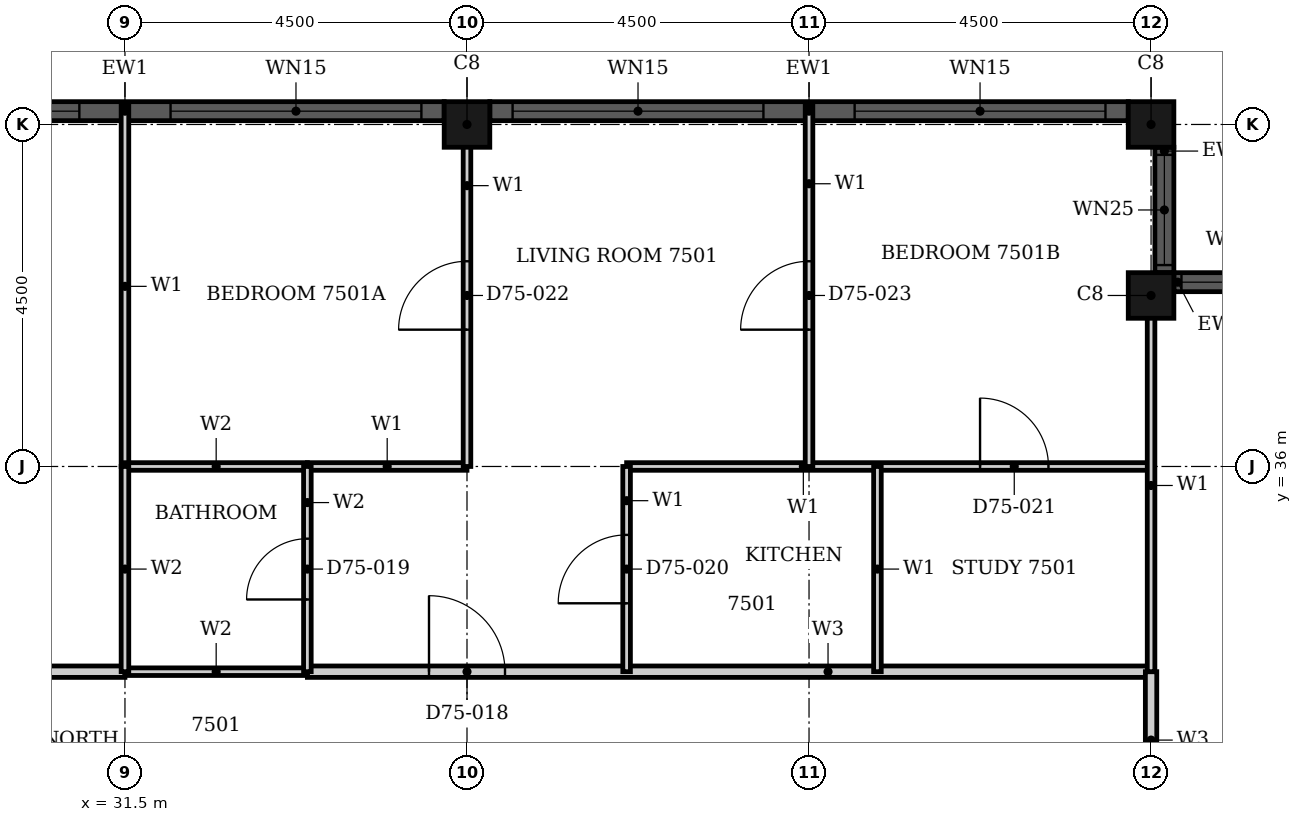
"""IFC4 building model, lengths in metres.
Left out: names, types, materials, properties, quantities, classifications, styles, units other than length and angle.
Written with IfcOpenShell. Run it as: python <this file> out.ifc"""

import sys

from ifc_helpers import new_model, si_unit, direction, frame, frame_2d, origin, origin_2d, place, context, subcontext, project, spatial, rectangle, hollow_rectangle, extrude, element, fill, save


model = new_model("IFC4")
c1 = context("Model", 3, precision=1e-05, world=origin(), true_north=direction((0.0, 1.0)))
c2 = subcontext(c1, "Body", "Model", "MODEL_VIEW")
j1 = project(units=[si_unit("LENGTHUNIT", "METRE"), si_unit("PLANEANGLEUNIT", "RADIAN")], contexts=[c1])
p1 = place(None, origin())
s1 = spatial("IfcSite", under=j1, at=p1, CompositionType="ELEMENT")
p2 = place(p1, origin())
s2 = spatial("IfcBuilding", under=s1, at=p2, CompositionType="ELEMENT")
p3 = place(p2, frame((0.0, 0.0, 294.5)))
s3 = spatial("IfcBuildingStorey", under=s2, at=p3, CompositionType="ELEMENT", Elevation=294.5)
for number, where, z_axis, x_axis in (
    (1, (45.0, 38.25, 0.0), (0.0, 0.0, 1.0), (1.0, 0.0, 0.0)),
    (2, (45.0, 40.5, 0.0), (0.0, 0.0, 1.0), (1.0, 0.0, 0.0)),
    (3, (36.0, 40.5, 0.0), (0.0, 0.0, 1.0), (1.0, 0.0, 0.0)),
):
    element("IfcColumn", number, at=place(p3, frame(where, z_axis=z_axis, x_axis=x_axis)), inside=s3, PredefinedType="COLUMN", context=c2, shape_type="SweptSolid", body=[
        extrude(hollow_rectangle(XDim=0.6, YDim=0.6, WallThickness=0.02, at=origin_2d()), origin(), (0.0, 0.0, 1.0), 3.7),
    ])
p4 = place(p3, frame((46.95, 38.425, 0.0), z_axis=(0.0, 0.0, 1.0), x_axis=(-1.0, 0.0, 0.0)))
e4 = element("IfcWall", 4, at=p4, inside=s3, PredefinedType="SOLIDWALL", context=c2, shape_type="SweptSolid", body=[
    extrude(rectangle(XDim=1.65, YDim=0.25, at=frame_2d((0.825, 0.0))), origin(), (0.0, 0.0, 1.0), 3.7),
])
p5 = place(p4, frame((0.1, 0.0, 0.9)))
e5 = element("IfcOpeningElement", 5, at=p5, cuts=e4, PredefinedType="OPENING", context=c2, shape_type="SweptSolid", body=[
    extrude(rectangle(XDim=1.45, YDim=1.85, at=frame_2d((0.725, 0.925))), frame((0.0, 0.135, 0.0), z_axis=(0.0, -1.0, 0.0), x_axis=(1.0, 0.0, 0.0)), (0.0, 0.0, 1.0), 0.27),
])
p6 = place(p3, frame((45.175, 38.55, 0.0), z_axis=(0.0, 0.0, 1.0), x_axis=(0.0, 1.0, 0.0)))
e6 = element("IfcWall", 6, at=p6, inside=s3, PredefinedType="SOLIDWALL", context=c2, shape_type="SweptSolid", body=[
    extrude(rectangle(XDim=1.65, YDim=0.25, at=frame_2d((0.825, 0.0))), origin(), (0.0, 0.0, 1.0), 3.7),
])
p7 = place(p6, frame((0.1, 0.0, 0.9)))
e7 = element("IfcOpeningElement", 7, at=p7, cuts=e6, PredefinedType="OPENING", context=c2, shape_type="SweptSolid", body=[
    extrude(rectangle(XDim=1.45, YDim=1.85, at=frame_2d((0.725, 0.925))), frame((0.0, 0.135, 0.0), z_axis=(0.0, -1.0, 0.0), x_axis=(1.0, 0.0, 0.0)), (0.0, 0.0, 1.0), 0.27),
])
p8 = place(p3, frame((44.7, 40.675, 0.0), z_axis=(0.0, 0.0, 1.0), x_axis=(-1.0, 0.0, 0.0)))
e8 = element("IfcWall", 8, at=p8, inside=s3, PredefinedType="SOLIDWALL", context=c2, shape_type="SweptSolid", body=[
    extrude(rectangle(XDim=8.4, YDim=0.25, at=frame_2d((4.2, 0.0))), origin(), (0.0, 0.0, 1.0), 3.7),
])
p9 = place(p8, frame((0.3, 0.0, 0.45)))
e9 = element("IfcOpeningElement", 9, at=p9, cuts=e8, PredefinedType="OPENING", context=c2, shape_type="SweptSolid", body=[
    extrude(rectangle(XDim=3.3, YDim=2.3, at=frame_2d((1.65, 1.15))), frame((0.0, 0.135, 0.0), z_axis=(0.0, -1.0, 0.0), x_axis=(1.0, 0.0, 0.0)), (0.0, 0.0, 1.0), 0.27),
])
p10 = place(p8, frame((4.8, 0.0, 0.45)))
e10 = element("IfcOpeningElement", 10, at=p10, cuts=e8, PredefinedType="OPENING", context=c2, shape_type="SweptSolid", body=[
    extrude(rectangle(XDim=3.3, YDim=2.3, at=frame_2d((1.65, 1.15))), frame((0.0, 0.135, 0.0), z_axis=(0.0, -1.0, 0.0), x_axis=(1.0, 0.0, 0.0)), (0.0, 0.0, 1.0), 0.27),
])
p11 = place(p3, frame((35.7, 40.675, 0.0), z_axis=(0.0, 0.0, 1.0), x_axis=(-1.0, 0.0, 0.0)))
e11 = element("IfcWall", 11, at=p11, inside=s3, PredefinedType="SOLIDWALL", context=c2, shape_type="SweptSolid", body=[
    extrude(rectangle(XDim=8.4, YDim=0.25, at=frame_2d((4.2, 0.0))), origin(), (0.0, 0.0, 1.0), 3.7),
])
p12 = place(p11, frame((0.3, 0.0, 0.45)))
e12 = element("IfcOpeningElement", 12, at=p12, cuts=e11, PredefinedType="OPENING", context=c2, shape_type="SweptSolid", body=[
    extrude(rectangle(XDim=3.3, YDim=2.3, at=frame_2d((1.65, 1.15))), frame((0.0, 0.135, 0.0), z_axis=(0.0, -1.0, 0.0), x_axis=(1.0, 0.0, 0.0)), (0.0, 0.0, 1.0), 0.27),
])
p13 = place(p11, frame((4.8, 0.0, 0.45)))
e13 = element("IfcOpeningElement", 13, at=p13, cuts=e11, PredefinedType="OPENING", context=c2, shape_type="SweptSolid", body=[
    extrude(rectangle(XDim=3.3, YDim=2.3, at=frame_2d((1.65, 1.15))), frame((0.0, 0.135, 0.0), z_axis=(0.0, -1.0, 0.0), x_axis=(1.0, 0.0, 0.0)), (0.0, 0.0, 1.0), 0.27),
])
p14 = place(p3, frame((18.0, 33.3, 0.0), z_axis=(0.0, 0.0, 1.0), x_axis=(1.0, 0.0, 0.0)))
e14 = element("IfcWall", 14, at=p14, inside=s3, PredefinedType="PARTITIONING", context=c2, shape_type="SweptSolid", body=[
    extrude(rectangle(XDim=13.5, YDim=0.15, at=frame_2d((6.75, 0.0))), origin(), (0.0, 0.0, 1.0), 3.4),
])
p15 = place(p14, frame((6.25, 0.0, 0.0)))
e15 = element("IfcOpeningElement", 15, at=p15, cuts=e14, PredefinedType="OPENING", context=c2, shape_type="SweptSolid", body=[
    extrude(rectangle(XDim=1.0, YDim=2.1, at=frame_2d((0.5, 1.05))), frame((0.0, 0.085, 0.0), z_axis=(0.0, -1.0, 0.0), x_axis=(1.0, 0.0, 0.0)), (0.0, 0.0, 1.0), 0.17),
])
p16 = place(p3, frame((33.9, 33.3, 0.0), z_axis=(0.0, 0.0, 1.0), x_axis=(1.0, 0.0, 0.0)))
e16 = element("IfcWall", 16, at=p16, inside=s3, PredefinedType="PARTITIONING", context=c2, shape_type="SweptSolid", body=[
    extrude(rectangle(XDim=11.1, YDim=0.15, at=frame_2d((5.55, 0.0))), origin(), (0.0, 0.0, 1.0), 3.4),
])
p17 = place(p16, frame((1.6, 0.0, 0.0)))
e17 = element("IfcOpeningElement", 17, at=p17, cuts=e16, PredefinedType="OPENING", context=c2, shape_type="SweptSolid", body=[
    extrude(rectangle(XDim=1.0, YDim=2.2, at=frame_2d((0.5, 1.1))), frame((0.0, 0.085, 0.0), z_axis=(0.0, -1.0, 0.0), x_axis=(1.0, 0.0, 0.0)), (0.0, 0.0, 1.0), 0.17),
])
p18 = place(p3, frame((45.0, 31.5, 0.0), z_axis=(0.0, 0.0, 1.0), x_axis=(0.0, 1.0, 0.0)))
e18 = element("IfcWall", 18, at=p18, inside=s3, PredefinedType="PARTITIONING", context=c2, shape_type="SweptSolid", body=[
    extrude(rectangle(XDim=1.8, YDim=0.15, at=frame_2d((0.9, 0.0))), origin(), (0.0, 0.0, 1.0), 3.4),
])
p19 = place(p3, frame((33.9, 36.0, 0.0), z_axis=(0.0, 0.0, 1.0), x_axis=(1.0, 0.0, 0.0)))
e19 = element("IfcWall", 19, at=p19, inside=s3, PredefinedType="PARTITIONING", context=c2, shape_type="SweptSolid", body=[
    extrude(rectangle(XDim=2.1, YDim=0.1, at=frame_2d((1.05, 0.0))), origin(), (0.0, 0.0, 1.0), 3.4),
])
p20 = place(p3, frame((38.1, 36.0, 0.0), z_axis=(0.0, 0.0, 1.0), x_axis=(1.0, 0.0, 0.0)))
e20 = element("IfcWall", 20, at=p20, inside=s3, PredefinedType="PARTITIONING", context=c2, shape_type="SweptSolid", body=[
    extrude(rectangle(XDim=6.9, YDim=0.1, at=frame_2d((3.45, 0.0))), origin(), (0.0, 0.0, 1.0), 3.4),
])
p21 = place(p20, frame((4.65, 0.0, 0.0)))
e21 = element("IfcOpeningElement", 21, at=p21, cuts=e20, PredefinedType="OPENING", context=c2, shape_type="SweptSolid", body=[
    extrude(rectangle(XDim=0.9, YDim=2.1, at=frame_2d((0.45, 1.05))), frame((0.0, 0.06, 0.0), z_axis=(0.0, -1.0, 0.0), x_axis=(1.0, 0.0, 0.0)), (0.0, 0.0, 1.0), 0.12),
])
p22 = place(p3, frame((31.5, 36.0, 0.0), z_axis=(0.0, 0.0, 1.0), x_axis=(0.0, 1.0, 0.0)))
e22 = element("IfcWall", 22, at=p22, inside=s3, PredefinedType="PARTITIONING", context=c2, shape_type="SweptSolid", body=[
    extrude(rectangle(XDim=4.74, YDim=0.1, at=frame_2d((2.37, 0.0))), origin(), (0.0, 0.0, 1.0), 3.4),
])
p23 = place(p3, frame((36.0, 36.0, 0.0), z_axis=(0.0, 0.0, 1.0), x_axis=(0.0, 1.0, 0.0)))
e23 = element("IfcWall", 23, at=p23, inside=s3, PredefinedType="PARTITIONING", context=c2, shape_type="SweptSolid", body=[
    extrude(rectangle(XDim=4.69, YDim=0.1, at=frame_2d((2.345, 0.0))), origin(), (0.0, 0.0, 1.0), 3.4),
])
p24 = place(p23, frame((1.8, 0.0, 0.0)))
e24 = element("IfcOpeningElement", 24, at=p24, cuts=e23, PredefinedType="OPENING", context=c2, shape_type="SweptSolid", body=[
    extrude(rectangle(XDim=0.9, YDim=2.1, at=frame_2d((0.45, 1.05))), frame((0.0, 0.06, 0.0), z_axis=(0.0, -1.0, 0.0), x_axis=(1.0, 0.0, 0.0)), (0.0, 0.0, 1.0), 0.12),
])
p25 = place(p3, frame((38.1, 33.3, 0.0), z_axis=(0.0, 0.0, 1.0), x_axis=(0.0, 1.0, 0.0)))
e25 = element("IfcWall", 25, at=p25, inside=s3, PredefinedType="PARTITIONING", context=c2, shape_type="SweptSolid", body=[
    extrude(rectangle(XDim=2.7, YDim=0.1, at=frame_2d((1.35, 0.0))), origin(), (0.0, 0.0, 1.0), 3.4),
])
p26 = place(p25, frame((0.9, 0.0, 0.0)))
e26 = element("IfcOpeningElement", 26, at=p26, cuts=e25, PredefinedType="OPENING", context=c2, shape_type="SweptSolid", body=[
    extrude(rectangle(XDim=0.9, YDim=2.1, at=frame_2d((0.45, 1.05))), frame((0.0, 0.06, 0.0), z_axis=(0.0, -1.0, 0.0), x_axis=(1.0, 0.0, 0.0)), (0.0, 0.0, 1.0), 0.12),
])
p27 = place(p3, frame((40.5, 36.0, 0.0), z_axis=(0.0, 0.0, 1.0), x_axis=(0.0, 1.0, 0.0)))
e27 = element("IfcWall", 27, at=p27, inside=s3, PredefinedType="PARTITIONING", context=c2, shape_type="SweptSolid", body=[
    extrude(rectangle(XDim=4.74, YDim=0.1, at=frame_2d((2.37, 0.0))), origin(), (0.0, 0.0, 1.0), 3.4),
])
p28 = place(p27, frame((1.8, 0.0, 0.0)))
e28 = element("IfcOpeningElement", 28, at=p28, cuts=e27, PredefinedType="OPENING", context=c2, shape_type="SweptSolid", body=[
    extrude(rectangle(XDim=0.9, YDim=2.1, at=frame_2d((0.45, 1.05))), frame((0.0, 0.06, 0.0), z_axis=(0.0, -1.0, 0.0), x_axis=(1.0, 0.0, 0.0)), (0.0, 0.0, 1.0), 0.12),
])
p29 = place(p3, frame((41.4, 33.3, 0.0), z_axis=(0.0, 0.0, 1.0), x_axis=(0.0, 1.0, 0.0)))
e29 = element("IfcWall", 29, at=p29, inside=s3, PredefinedType="PARTITIONING", context=c2, shape_type="SweptSolid", body=[
    extrude(rectangle(XDim=2.7, YDim=0.1, at=frame_2d((1.35, 0.0))), origin(), (0.0, 0.0, 1.0), 3.4),
])
p30 = place(p3, frame((45.0, 33.3, 0.0), z_axis=(0.0, 0.0, 1.0), x_axis=(0.0, 1.0, 0.0)))
e30 = element("IfcWall", 30, at=p30, inside=s3, PredefinedType="PARTITIONING", context=c2, shape_type="SweptSolid", body=[
    extrude(rectangle(XDim=4.9, YDim=0.1, at=frame_2d((2.45, 0.0))), origin(), (0.0, 0.0, 1.0), 3.4),
])
for number, where, z_axis, x_axis in (
    (31, (31.5, 33.3, 0.0), (0.0, 0.0, 1.0), (1.0, 0.0, 0.0)),
    (32, (31.5, 36.0, 0.0), (0.0, 0.0, 1.0), (1.0, 0.0, 0.0)),
):
    element("IfcWall", number, at=place(p3, frame(where, z_axis=z_axis, x_axis=x_axis)), inside=s3, PredefinedType="PARTITIONING", context=c2, shape_type="SweptSolid", body=[
        extrude(rectangle(XDim=2.4, YDim=0.1, at=frame_2d((1.2, 0.0))), origin(), (0.0, 0.0, 1.0), 3.4),
    ])
p31 = place(p3, frame((31.5, 33.3, 0.0), z_axis=(0.0, 0.0, 1.0), x_axis=(0.0, 1.0, 0.0)))
e33 = element("IfcWall", 33, at=p31, inside=s3, PredefinedType="PARTITIONING", context=c2, shape_type="SweptSolid", body=[
    extrude(rectangle(XDim=2.7, YDim=0.1, at=frame_2d((1.35, 0.0))), origin(), (0.0, 0.0, 1.0), 3.4),
])
p32 = place(p3, frame((33.9, 33.3, 0.0), z_axis=(0.0, 0.0, 1.0), x_axis=(0.0, 1.0, 0.0)))
e34 = element("IfcWall", 34, at=p32, inside=s3, PredefinedType="PARTITIONING", context=c2, shape_type="SweptSolid", body=[
    extrude(rectangle(XDim=2.7, YDim=0.1, at=frame_2d((1.35, 0.0))), origin(), (0.0, 0.0, 1.0), 3.4),
])
p33 = place(p32, frame((0.95, 0.0, 0.0)))
e35 = element("IfcOpeningElement", 35, at=p33, cuts=e34, PredefinedType="OPENING", context=c2, shape_type="SweptSolid", body=[
    extrude(rectangle(XDim=0.8, YDim=2.1, at=frame_2d((0.4, 1.05))), frame((0.0, 0.06, 0.0), z_axis=(0.0, -1.0, 0.0), x_axis=(1.0, 0.0, 0.0)), (0.0, 0.0, 1.0), 0.12),
])
p34 = place(p5, origin())
e36 = element("IfcWindow", 36, at=p34, inside=s3, PartitioningType="SINGLE_PANEL", PredefinedType="WINDOW", context=c2, shape_type="SweptSolid", body=[
    extrude(rectangle(XDim=1.45, YDim=1.85, at=frame_2d((0.725, 0.925))), frame((0.0, 0.03, 0.0), z_axis=(0.0, -1.0, 0.0), x_axis=(1.0, 0.0, 0.0)), (0.0, 0.0, 1.0), 0.06),
])
fill(e5, e36)
p35 = place(p7, origin())
e37 = element("IfcWindow", 37, at=p35, inside=s3, PartitioningType="SINGLE_PANEL", PredefinedType="WINDOW", context=c2, shape_type="SweptSolid", body=[
    extrude(rectangle(XDim=1.45, YDim=1.85, at=frame_2d((0.725, 0.925))), frame((0.0, 0.03, 0.0), z_axis=(0.0, -1.0, 0.0), x_axis=(1.0, 0.0, 0.0)), (0.0, 0.0, 1.0), 0.06),
])
fill(e7, e37)
p36 = place(p9, origin())
e38 = element("IfcWindow", 38, at=p36, inside=s3, PartitioningType="SINGLE_PANEL", PredefinedType="WINDOW", context=c2, shape_type="SweptSolid", body=[
    extrude(rectangle(XDim=3.3, YDim=2.3, at=frame_2d((1.65, 1.15))), frame((0.0, 0.03, 0.0), z_axis=(0.0, -1.0, 0.0), x_axis=(1.0, 0.0, 0.0)), (0.0, 0.0, 1.0), 0.06),
])
fill(e9, e38)
p37 = place(p10, origin())
e39 = element("IfcWindow", 39, at=p37, inside=s3, PartitioningType="SINGLE_PANEL", PredefinedType="WINDOW", context=c2, shape_type="SweptSolid", body=[
    extrude(rectangle(XDim=3.3, YDim=2.3, at=frame_2d((1.65, 1.15))), frame((0.0, 0.03, 0.0), z_axis=(0.0, -1.0, 0.0), x_axis=(1.0, 0.0, 0.0)), (0.0, 0.0, 1.0), 0.06),
])
fill(e10, e39)
p38 = place(p12, origin())
e40 = element("IfcWindow", 40, at=p38, inside=s3, PartitioningType="SINGLE_PANEL", PredefinedType="WINDOW", context=c2, shape_type="SweptSolid", body=[
    extrude(rectangle(XDim=3.3, YDim=2.3, at=frame_2d((1.65, 1.15))), frame((0.0, 0.03, 0.0), z_axis=(0.0, -1.0, 0.0), x_axis=(1.0, 0.0, 0.0)), (0.0, 0.0, 1.0), 0.06),
])
fill(e12, e40)
p39 = place(p13, origin())
e41 = element("IfcWindow", 41, at=p39, inside=s3, PartitioningType="SINGLE_PANEL", PredefinedType="WINDOW", context=c2, shape_type="SweptSolid", body=[
    extrude(rectangle(XDim=3.3, YDim=2.3, at=frame_2d((1.65, 1.15))), frame((0.0, 0.03, 0.0), z_axis=(0.0, -1.0, 0.0), x_axis=(1.0, 0.0, 0.0)), (0.0, 0.0, 1.0), 0.06),
])
fill(e13, e41)
p40 = place(p17, origin())
e42 = element("IfcDoor", 42, at=p40, inside=s3, OperationType="SINGLE_SWING_RIGHT", PredefinedType="DOOR", context=c2, shape_type="SweptSolid", body=[
    extrude(rectangle(XDim=1.0, YDim=2.2, at=frame_2d((0.5, 1.1))), frame((0.0, 0.025, 0.0), z_axis=(0.0, -1.0, 0.0), x_axis=(1.0, 0.0, 0.0)), (0.0, 0.0, 1.0), 0.05),
])
fill(e17, e42)
p41 = place(p33, origin())
e43 = element("IfcDoor", 43, at=p41, inside=s3, OperationType="SINGLE_SWING_RIGHT", PredefinedType="DOOR", context=c2, shape_type="SweptSolid", body=[
    extrude(rectangle(XDim=0.8, YDim=2.1, at=frame_2d((0.4, 1.05))), frame((0.0, 0.025, 0.0), z_axis=(0.0, -1.0, 0.0), x_axis=(1.0, 0.0, 0.0)), (0.0, 0.0, 1.0), 0.05),
])
fill(e35, e43)
p42 = place(p26, origin())
e44 = element("IfcDoor", 44, at=p42, inside=s3, OperationType="SINGLE_SWING_RIGHT", PredefinedType="DOOR", context=c2, shape_type="SweptSolid", body=[
    extrude(rectangle(XDim=0.9, YDim=2.1, at=frame_2d((0.45, 1.05))), frame((0.0, 0.025, 0.0), z_axis=(0.0, -1.0, 0.0), x_axis=(1.0, 0.0, 0.0)), (0.0, 0.0, 1.0), 0.05),
])
fill(e26, e44)
p43 = place(p21, origin())
e45 = element("IfcDoor", 45, at=p43, inside=s3, OperationType="SINGLE_SWING_LEFT", PredefinedType="DOOR", context=c2, shape_type="SweptSolid", body=[
    extrude(rectangle(XDim=0.9, YDim=2.1, at=frame_2d((0.45, 1.05))), frame((0.0, 0.025, 0.0), z_axis=(0.0, -1.0, 0.0), x_axis=(1.0, 0.0, 0.0)), (0.0, 0.0, 1.0), 0.05),
])
fill(e21, e45)
p44 = place(p24, origin())
e46 = element("IfcDoor", 46, at=p44, inside=s3, OperationType="SINGLE_SWING_RIGHT", PredefinedType="DOOR", context=c2, shape_type="SweptSolid", body=[
    extrude(rectangle(XDim=0.9, YDim=2.1, at=frame_2d((0.45, 1.05))), frame((0.0, 0.025, 0.0), z_axis=(0.0, -1.0, 0.0), x_axis=(1.0, 0.0, 0.0)), (0.0, 0.0, 1.0), 0.05),
])
fill(e24, e46)
p45 = place(p28, origin())
e47 = element("IfcDoor", 47, at=p45, inside=s3, OperationType="SINGLE_SWING_LEFT", PredefinedType="DOOR", context=c2, shape_type="SweptSolid", body=[
    extrude(rectangle(XDim=0.9, YDim=2.1, at=frame_2d((0.45, 1.05))), frame((0.0, 0.025, 0.0), z_axis=(0.0, -1.0, 0.0), x_axis=(1.0, 0.0, 0.0)), (0.0, 0.0, 1.0), 0.05),
])
fill(e28, e47)
save(model, sys.argv[1])
